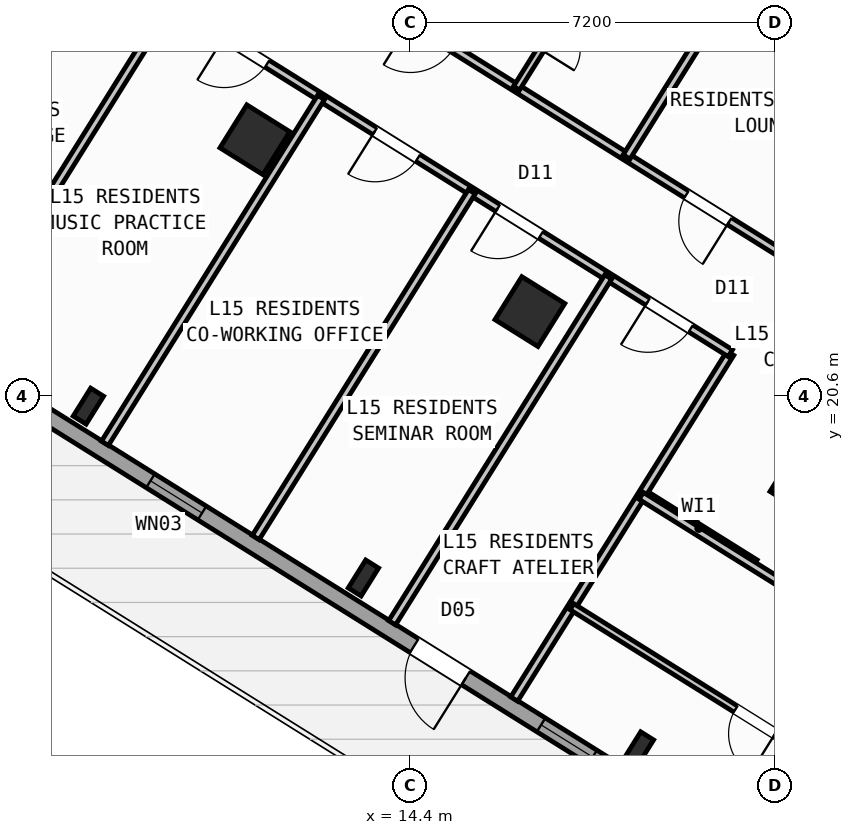
"""IFC4 building model, lengths in metres.
Left out: names, types, materials, properties, quantities, classifications, styles, units other than length and angle.
Written with IfcOpenShell. Run it as: python <this file> out.ifc"""

import sys

from ifc_helpers import new_model, si_unit, direction, frame, frame_2d, origin, origin_2d, place, context, subcontext, project, spatial, rectangle, hollow_rectangle, i_section, extrude, source, transform, mapped, element, fill, save


model = new_model("IFC4")
c1 = context("Model", 3, precision=1e-05, world=origin(), true_north=direction((0.0, 1.0)))
c2 = subcontext(c1, "Body", "Model", "MODEL_VIEW")
j1 = project(units=[si_unit("LENGTHUNIT", "METRE"), si_unit("PLANEANGLEUNIT", "RADIAN")], contexts=[c1])
p1 = place(None, origin())
s1 = spatial("IfcSite", under=j1, at=p1, CompositionType="ELEMENT")
p2 = place(p1, origin())
s2 = spatial("IfcBuilding", under=s1, at=p2, CompositionType="ELEMENT")
p3 = place(p2, frame((0.0, 0.0, 60.0)))
s3 = spatial("IfcBuildingStorey", under=s2, at=p3, CompositionType="ELEMENT", Elevation=60.0)
m1 = source(origin(), c2, "Body", "SweptSolid", [
    extrude(hollow_rectangle(XDim=1.0, YDim=1.0, WallThickness=0.04, at=origin_2d()), origin(), (0.0, 0.0, 1.0), 3.6),
])
p4 = place(p3, frame((22.191, 18.87, 0.0), z_axis=(0.0, 0.0, 1.0), x_axis=(-0.848048096156, 0.529919264233, 0.0)))
e1 = element("IfcColumn", 1, at=p4, inside=s3, PredefinedType="COLUMN", context=c2, shape_type="MappedRepresentation", body=[
    mapped(m1, transform((0.0, 0.0, 0.0), scale=1.0)),
])
m2 = source(origin(), c2, "Body", "SweptSolid", [
    extrude(i_section(OverallWidth=0.3, OverallDepth=0.65, WebThickness=0.016, FlangeThickness=0.031, at=origin_2d()), origin(), (0.0, 0.0, 1.0), 3.6),
])
p5 = place(p3, frame((18.906, 13.612, 0.0), z_axis=(0.0, 0.0, 1.0), x_axis=(-0.848048096156, 0.529919264233, 0.0)))
e2 = element("IfcColumn", 2, at=p5, inside=s3, PredefinedType="COLUMN", context=c2, shape_type="MappedRepresentation", body=[
    mapped(m2, transform((0.0, 0.0, 0.0), scale=1.0)),
])
p6 = place(p3, frame((16.764, 22.261, 0.0), z_axis=(0.0, 0.0, 1.0), x_axis=(-0.848048096156, 0.529919264233, 0.0)))
e3 = element("IfcColumn", 3, at=p6, inside=s3, PredefinedType="COLUMN", context=c2, shape_type="MappedRepresentation", body=[
    mapped(m1, transform((0.0, 0.0, 0.0), scale=1.0)),
])
p7 = place(p3, frame((13.478, 17.003, 0.0), z_axis=(0.0, 0.0, 1.0), x_axis=(-0.848048096156, 0.529919264233, 0.0)))
e4 = element("IfcColumn", 4, at=p7, inside=s3, PredefinedType="COLUMN", context=c2, shape_type="MappedRepresentation", body=[
    mapped(m2, transform((0.0, 0.0, 0.0), scale=1.0)),
])
p8 = place(p3, frame((11.336, 25.653, 0.0), z_axis=(0.0, 0.0, 1.0), x_axis=(-0.848048096156, 0.529919264233, 0.0)))
e5 = element("IfcColumn", 5, at=p8, inside=s3, PredefinedType="COLUMN", context=c2, shape_type="MappedRepresentation", body=[
    mapped(m1, transform((0.0, 0.0, 0.0), scale=1.0)),
])
p9 = place(p3, frame((8.051, 20.395, 0.0), z_axis=(0.0, 0.0, 1.0), x_axis=(-0.848048096156, 0.529919264233, 0.0)))
e6 = element("IfcColumn", 6, at=p9, inside=s3, PredefinedType="COLUMN", context=c2, shape_type="MappedRepresentation", body=[
    mapped(m2, transform((0.0, 0.0, 0.0), scale=1.0)),
])
p10 = place(p3, frame((29.268, 6.429, 0.0), z_axis=(0.0, 0.0, 1.0), x_axis=(-0.848049971435, 0.529916263149, 0.0)))
e7 = element("IfcWall", 7, at=p10, inside=s3, PredefinedType="STANDARD", context=c2, shape_type="SweptSolid", body=[
    extrude(rectangle(XDim=31.588, YDim=0.32, at=frame_2d((15.794, 0.0))), origin(), (0.0, 0.0, 1.0), 3.35),
])
p11 = place(p10, frame((16.235, 0.0, 0.0)))
e8 = element("IfcOpeningElement", 8, at=p11, cuts=e7, PredefinedType="OPENING", context=c2, shape_type="SweptSolid", body=[
    extrude(rectangle(XDim=1.2, YDim=2.15, at=frame_2d((0.6, 1.075))), frame((0.0, 0.17, 0.0), z_axis=(0.0, -1.0, 0.0), x_axis=(1.0, 0.0, 0.0)), (0.0, 0.0, 1.0), 0.34),
])
p12 = place(p10, frame((2.989, 0.0, 0.8)))
e9 = element("IfcOpeningElement", 9, at=p12, cuts=e7, PredefinedType="OPENING", context=c2, shape_type="SweptSolid", body=[
    extrude(rectangle(XDim=2.1, YDim=1.55, at=frame_2d((1.05, 0.775))), frame((0.0, 0.17, 0.0), z_axis=(0.0, -1.0, 0.0), x_axis=(1.0, 0.0, 0.0)), (0.0, 0.0, 1.0), 0.34),
])
p13 = place(p10, frame((8.359, 0.0, 0.8)))
e10 = element("IfcOpeningElement", 10, at=p13, cuts=e7, PredefinedType="OPENING", context=c2, shape_type="SweptSolid", body=[
    extrude(rectangle(XDim=2.1, YDim=1.55, at=frame_2d((1.05, 0.775))), frame((0.0, 0.17, 0.0), z_axis=(0.0, -1.0, 0.0), x_axis=(1.0, 0.0, 0.0)), (0.0, 0.0, 1.0), 0.34),
])
p14 = place(p10, frame((13.284, 0.0, 0.95)))
e11 = element("IfcOpeningElement", 11, at=p14, cuts=e7, PredefinedType="OPENING", context=c2, shape_type="SweptSolid", body=[
    extrude(rectangle(XDim=1.2, YDim=1.4, at=frame_2d((0.6, 0.7))), frame((0.0, 0.17, 0.0), z_axis=(0.0, -1.0, 0.0), x_axis=(1.0, 0.0, 0.0)), (0.0, 0.0, 1.0), 0.34),
])
p15 = place(p10, frame((22.374, 0.0, 0.95)))
e12 = element("IfcOpeningElement", 12, at=p15, cuts=e7, PredefinedType="OPENING", context=c2, shape_type="SweptSolid", body=[
    extrude(rectangle(XDim=1.2, YDim=1.4, at=frame_2d((0.6, 0.7))), frame((0.0, 0.17, 0.0), z_axis=(0.0, -1.0, 0.0), x_axis=(1.0, 0.0, 0.0)), (0.0, 0.0, 1.0), 0.34),
])
p16 = place(p10, frame((26.351, 0.0, 1.0)))
e13 = element("IfcOpeningElement", 13, at=p16, cuts=e7, PredefinedType="OPENING", context=c2, shape_type="SweptSolid", body=[
    extrude(rectangle(XDim=0.9, YDim=1.25, at=frame_2d((0.45, 0.625))), frame((0.0, 0.17, 0.0), z_axis=(0.0, -1.0, 0.0), x_axis=(1.0, 0.0, 0.0)), (0.0, 0.0, 1.0), 0.34),
])
p17 = place(p10, frame((29.052, 0.0, 0.85)))
e14 = element("IfcOpeningElement", 14, at=p17, cuts=e7, PredefinedType="OPENING", context=c2, shape_type="SweptSolid", body=[
    extrude(rectangle(XDim=1.8, YDim=1.5, at=frame_2d((0.9, 0.75))), frame((0.0, 0.17, 0.0), z_axis=(0.0, -1.0, 0.0), x_axis=(1.0, 0.0, 0.0)), (0.0, 0.0, 1.0), 0.34),
])
p18 = place(p3, frame((2.415, 23.452, 0.0), z_axis=(0.0, 0.0, 1.0), x_axis=(0.52991049553, 0.848053575387, 0.0)))
e15 = element("IfcWall", 15, at=p18, inside=s3, PredefinedType="STANDARD", context=c2, shape_type="SweptSolid", body=[
    extrude(rectangle(XDim=21.587, YDim=0.32, at=frame_2d((10.794, 0.0))), origin(), (0.0, 0.0, 1.0), 2.725),
])
p19 = place(p18, frame((2.356, 0.0, 0.8)))
e16 = element("IfcOpeningElement", 16, at=p19, cuts=e15, PredefinedType="OPENING", context=c2, shape_type="SweptSolid", body=[
    extrude(rectangle(XDim=2.1, YDim=1.55, at=frame_2d((1.05, 0.775))), frame((0.0, 0.17, 0.0), z_axis=(0.0, -1.0, 0.0), x_axis=(1.0, 0.0, 0.0)), (0.0, 0.0, 1.0), 0.34),
])
p20 = place(p18, frame((10.949, 0.0, 1.0)))
e17 = element("IfcOpeningElement", 17, at=p20, cuts=e15, PredefinedType="OPENING", context=c2, shape_type="SweptSolid", body=[
    extrude(rectangle(XDim=0.9, YDim=1.25, at=frame_2d((0.45, 0.625))), frame((0.0, 0.17, 0.0), z_axis=(0.0, -1.0, 0.0), x_axis=(1.0, 0.0, 0.0)), (0.0, 0.0, 1.0), 0.34),
])
p21 = place(p18, frame((15.394, 0.0, 0.85)))
e18 = element("IfcOpeningElement", 18, at=p21, cuts=e15, PredefinedType="OPENING", context=c2, shape_type="SweptSolid", body=[
    extrude(rectangle(XDim=1.5, YDim=1.5, at=frame_2d((0.75, 0.75))), frame((0.0, 0.17, 0.0), z_axis=(0.0, -1.0, 0.0), x_axis=(1.0, 0.0, 0.0)), (0.0, 0.0, 1.0), 0.34),
])
p22 = place(p18, frame((18.194, 0.0, 0.85)))
e19 = element("IfcOpeningElement", 19, at=p22, cuts=e15, PredefinedType="OPENING", context=c2, shape_type="SweptSolid", body=[
    extrude(rectangle(XDim=1.5, YDim=1.5, at=frame_2d((0.75, 0.75))), frame((0.0, 0.17, 0.0), z_axis=(0.0, -1.0, 0.0), x_axis=(1.0, 0.0, 0.0)), (0.0, 0.0, 1.0), 0.34),
])
p23 = place(p3, frame((14.138, 41.825, 0.0), z_axis=(0.0, 0.0, 1.0), x_axis=(0.848046498049, -0.529921821731, 0.0)))
e20 = element("IfcWall", 20, at=p23, inside=s3, PredefinedType="STANDARD", context=c2, shape_type="SweptSolid", body=[
    extrude(rectangle(XDim=31.588, YDim=0.32, at=frame_2d((15.794, 0.0))), origin(), (0.0, 0.0, 1.0), 3.35),
])
p24 = place(p23, frame((9.772, 0.0, 0.0)))
e21 = element("IfcOpeningElement", 21, at=p24, cuts=e20, PredefinedType="OPENING", context=c2, shape_type="SweptSolid", body=[
    extrude(rectangle(XDim=1.05, YDim=2.15, at=frame_2d((0.525, 1.075))), frame((0.0, 0.17, 0.0), z_axis=(0.0, -1.0, 0.0), x_axis=(1.0, 0.0, 0.0)), (0.0, 0.0, 1.0), 0.34),
])
p25 = place(p23, frame((0.966, 0.0, 0.85)))
e22 = element("IfcOpeningElement", 22, at=p25, cuts=e20, PredefinedType="OPENING", context=c2, shape_type="SweptSolid", body=[
    extrude(rectangle(XDim=1.5, YDim=1.5, at=frame_2d((0.75, 0.75))), frame((0.0, 0.17, 0.0), z_axis=(0.0, -1.0, 0.0), x_axis=(1.0, 0.0, 0.0)), (0.0, 0.0, 1.0), 0.34),
])
p26 = place(p23, frame((4.121, 0.0, 1.0)))
e23 = element("IfcOpeningElement", 23, at=p26, cuts=e20, PredefinedType="OPENING", context=c2, shape_type="SweptSolid", body=[
    extrude(rectangle(XDim=0.9, YDim=1.25, at=frame_2d((0.45, 0.625))), frame((0.0, 0.17, 0.0), z_axis=(0.0, -1.0, 0.0), x_axis=(1.0, 0.0, 0.0)), (0.0, 0.0, 1.0), 0.34),
])
p27 = place(p23, frame((13.899, 0.0, 0.85)))
e24 = element("IfcOpeningElement", 24, at=p27, cuts=e20, PredefinedType="OPENING", context=c2, shape_type="SweptSolid", body=[
    extrude(rectangle(XDim=1.5, YDim=1.5, at=frame_2d((0.75, 0.75))), frame((0.0, 0.17, 0.0), z_axis=(0.0, -1.0, 0.0), x_axis=(1.0, 0.0, 0.0)), (0.0, 0.0, 1.0), 0.34),
])
p28 = place(p23, frame((22.019, 0.0, 0.95)))
e25 = element("IfcOpeningElement", 25, at=p28, cuts=e20, PredefinedType="OPENING", context=c2, shape_type="SweptSolid", body=[
    extrude(rectangle(XDim=1.2, YDim=1.4, at=frame_2d((0.6, 0.7))), frame((0.0, 0.17, 0.0), z_axis=(0.0, -1.0, 0.0), x_axis=(1.0, 0.0, 0.0)), (0.0, 0.0, 1.0), 0.34),
])
p29 = place(p23, frame((27.569, 0.0, 0.95)))
e26 = element("IfcOpeningElement", 26, at=p29, cuts=e20, PredefinedType="OPENING", context=c2, shape_type="SweptSolid", body=[
    extrude(rectangle(XDim=1.2, YDim=1.4, at=frame_2d((0.6, 0.7))), frame((0.0, 0.17, 0.0), z_axis=(0.0, -1.0, 0.0), x_axis=(1.0, 0.0, 0.0)), (0.0, 0.0, 1.0), 0.34),
])
p30 = place(p3, frame((21.206, 17.292, 0.0), z_axis=(0.0, 0.0, 1.0), x_axis=(-0.848050851465, 0.529914854792, 0.0)))
e27 = element("IfcWall", 27, at=p30, inside=s3, PredefinedType="PARTITIONING", context=c2, shape_type="SweptSolid", body=[
    extrude(rectangle(XDim=2.61, YDim=0.16, at=frame_2d((1.305, 0.0))), origin(), (0.0, 0.0, 1.0), 3.34),
])
p31 = place(p3, frame((20.719, 21.44, 0.0), z_axis=(0.0, 0.0, 1.0), x_axis=(-0.529906246318, -0.848056230514, 0.0)))
e28 = element("IfcWall", 28, at=p31, inside=s3, PredefinedType="PARTITIONING", context=c2, shape_type="SweptSolid", body=[
    extrude(rectangle(XDim=8.05, YDim=0.16, at=frame_2d((4.025, 0.0))), origin(), (0.0, 0.0, 1.0), 3.34),
])
p32 = place(p3, frame((21.885, 23.306, 0.0), z_axis=(0.0, 0.0, 1.0), x_axis=(-0.848052408131, 0.529912363569, 0.0)))
e29 = element("IfcWall", 29, at=p32, inside=s3, PredefinedType="PARTITIONING", context=c2, shape_type="SweptSolid", body=[
    extrude(rectangle(XDim=16.73, YDim=0.16, at=frame_2d((8.365, 0.0))), origin(), (0.0, 0.0, 1.0), 3.34),
])
p33 = place(p32, frame((1.395, 0.0, 0.0)))
e30 = element("IfcOpeningElement", 30, at=p33, cuts=e29, PredefinedType="OPENING", context=c2, shape_type="SweptSolid", body=[
    extrude(rectangle(XDim=1.0, YDim=2.1, at=frame_2d((0.5, 1.05))), frame((0.0, 0.09, 0.0), z_axis=(0.0, -1.0, 0.0), x_axis=(1.0, 0.0, 0.0)), (0.0, 0.0, 1.0), 0.18),
])
p34 = place(p32, frame((7.82, 0.0, 0.0)))
e31 = element("IfcOpeningElement", 31, at=p34, cuts=e29, PredefinedType="OPENING", context=c2, shape_type="SweptSolid", body=[
    extrude(rectangle(XDim=1.0, YDim=2.1, at=frame_2d((0.5, 1.05))), frame((0.0, 0.09, 0.0), z_axis=(0.0, -1.0, 0.0), x_axis=(1.0, 0.0, 0.0)), (0.0, 0.0, 1.0), 0.18),
])
p35 = place(p32, frame((11.14, 0.0, 0.0)))
e32 = element("IfcOpeningElement", 32, at=p35, cuts=e29, PredefinedType="OPENING", context=c2, shape_type="SweptSolid", body=[
    extrude(rectangle(XDim=1.0, YDim=2.1, at=frame_2d((0.5, 1.05))), frame((0.0, 0.09, 0.0), z_axis=(0.0, -1.0, 0.0), x_axis=(1.0, 0.0, 0.0)), (0.0, 0.0, 1.0), 0.18),
])
p36 = place(p3, frame((20.719, 21.44, 0.0), z_axis=(0.0, 0.0, 1.0), x_axis=(-0.848048310262, 0.529918921593, 0.0)))
e33 = element("IfcWall", 33, at=p36, inside=s3, PredefinedType="PARTITIONING", context=c2, shape_type="SweptSolid", body=[
    extrude(rectangle(XDim=16.73, YDim=0.16, at=frame_2d((8.365, 0.0))), origin(), (0.0, 0.0, 1.0), 3.34),
])
p37 = place(p36, frame((0.92, 0.0, 0.0)))
e34 = element("IfcOpeningElement", 34, at=p37, cuts=e33, PredefinedType="OPENING", context=c2, shape_type="SweptSolid", body=[
    extrude(rectangle(XDim=1.0, YDim=2.1, at=frame_2d((0.5, 1.05))), frame((0.0, 0.09, 0.0), z_axis=(0.0, -1.0, 0.0), x_axis=(1.0, 0.0, 0.0)), (0.0, 0.0, 1.0), 0.18),
])
p38 = place(p36, frame((4.408, 0.0, 0.0)))
e35 = element("IfcOpeningElement", 35, at=p38, cuts=e33, PredefinedType="OPENING", context=c2, shape_type="SweptSolid", body=[
    extrude(rectangle(XDim=1.0, YDim=2.1, at=frame_2d((0.5, 1.05))), frame((0.0, 0.09, 0.0), z_axis=(0.0, -1.0, 0.0), x_axis=(1.0, 0.0, 0.0)), (0.0, 0.0, 1.0), 0.18),
])
p39 = place(p36, frame((7.271, 0.0, 0.0)))
e36 = element("IfcOpeningElement", 36, at=p39, cuts=e33, PredefinedType="OPENING", context=c2, shape_type="SweptSolid", body=[
    extrude(rectangle(XDim=1.0, YDim=2.1, at=frame_2d((0.5, 1.05))), frame((0.0, 0.09, 0.0), z_axis=(0.0, -1.0, 0.0), x_axis=(1.0, 0.0, 0.0)), (0.0, 0.0, 1.0), 0.18),
])
p40 = place(p36, frame((10.78, 0.0, 0.0)))
e37 = element("IfcOpeningElement", 37, at=p40, cuts=e33, PredefinedType="OPENING", context=c2, shape_type="SweptSolid", body=[
    extrude(rectangle(XDim=1.0, YDim=2.1, at=frame_2d((0.5, 1.05))), frame((0.0, 0.09, 0.0), z_axis=(0.0, -1.0, 0.0), x_axis=(1.0, 0.0, 0.0)), (0.0, 0.0, 1.0), 0.18),
])
p41 = place(p36, frame((14.372, 0.0, 0.0)))
e38 = element("IfcOpeningElement", 38, at=p41, cuts=e33, PredefinedType="OPENING", context=c2, shape_type="SweptSolid", body=[
    extrude(rectangle(XDim=1.0, YDim=2.1, at=frame_2d((0.5, 1.05))), frame((0.0, 0.09, 0.0), z_axis=(0.0, -1.0, 0.0), x_axis=(1.0, 0.0, 0.0)), (0.0, 0.0, 1.0), 0.18),
])
p42 = place(p3, frame((18.31, 22.946, 0.0), z_axis=(0.0, 0.0, 1.0), x_axis=(-0.529914428959, -0.848051117552, 0.0)))
e39 = element("IfcWall", 39, at=p42, inside=s3, PredefinedType="PARTITIONING", context=c2, shape_type="SweptSolid", body=[
    extrude(rectangle(XDim=8.05, YDim=0.16, at=frame_2d((4.025, 0.0))), origin(), (0.0, 0.0, 1.0), 3.34),
])
p43 = place(p3, frame((15.618, 24.628, 0.0), z_axis=(0.0, 0.0, 1.0), x_axis=(-0.529928058306, -0.848042600947, 0.0)))
e40 = element("IfcWall", 40, at=p43, inside=s3, PredefinedType="PARTITIONING", context=c2, shape_type="SweptSolid", body=[
    extrude(rectangle(XDim=8.05, YDim=0.16, at=frame_2d((4.025, 0.0))), origin(), (0.0, 0.0, 1.0), 2.995),
])
p44 = place(p3, frame((12.642, 26.488, 0.0), z_axis=(0.0, 0.0, 1.0), x_axis=(-0.529914428959, -0.848051117552, 0.0)))
e41 = element("IfcWall", 41, at=p44, inside=s3, PredefinedType="PARTITIONING", context=c2, shape_type="SweptSolid", body=[
    extrude(rectangle(XDim=8.05, YDim=0.16, at=frame_2d((4.025, 0.0))), origin(), (0.0, 0.0, 1.0), 3.34),
])
p45 = place(p3, frame((9.666, 28.347, 0.0), z_axis=(0.0, 0.0, 1.0), x_axis=(-0.529928058306, -0.848042600947, 0.0)))
e42 = element("IfcWall", 42, at=p45, inside=s3, PredefinedType="PARTITIONING", context=c2, shape_type="SweptSolid", body=[
    extrude(rectangle(XDim=8.05, YDim=0.16, at=frame_2d((4.025, 0.0))), origin(), (0.0, 0.0, 1.0), 3.34),
])
p46 = place(p3, frame((20.361, 28.018, 0.0), z_axis=(0.0, 0.0, 1.0), x_axis=(-0.529875025416, -0.848075738033, 0.0)))
e43 = element("IfcWall", 43, at=p46, inside=s3, PredefinedType="PARTITIONING", context=c2, shape_type="SweptSolid", body=[
    extrude(rectangle(XDim=3.188, YDim=0.16, at=frame_2d((1.594, 0.0))), origin(), (0.0, 0.0, 1.0), 2.725),
])
p47 = place(p3, frame((17.867, 28.859, 0.0), z_axis=(0.0, 0.0, 1.0), x_axis=(-0.529913878929, -0.848051461244, 0.0)))
e44 = element("IfcWall", 44, at=p47, inside=s3, PredefinedType="PLUMBINGWALL", context=c2, shape_type="SweptSolid", body=[
    extrude(rectangle(XDim=2.58, YDim=0.14, at=frame_2d((1.29, 0.0))), origin(), (0.0, 0.0, 1.0), 3.34),
])
p48 = place(p47, frame((0.9, 0.0, 0.0)))
e45 = element("IfcOpeningElement", 45, at=p48, cuts=e44, PredefinedType="OPENING", context=c2, shape_type="SweptSolid", body=[
    extrude(rectangle(XDim=0.78, YDim=2.05, at=frame_2d((0.39, 1.025))), frame((0.0, 0.08, 0.0), z_axis=(0.0, -1.0, 0.0), x_axis=(1.0, 0.0, 0.0)), (0.0, 0.0, 1.0), 0.16),
])
p49 = place(p3, frame((32.164, 10.374, 0.0), z_axis=(0.0, 0.0, 1.0), x_axis=(-0.848044107957, 0.529925646633, 0.0)))
e46 = element("IfcWall", 46, at=p49, inside=s3, PredefinedType="PARTITIONING", context=c2, shape_type="SweptSolid", body=[
    extrude(rectangle(XDim=15.57, YDim=0.16, at=frame_2d((7.785, 0.0))), origin(), (0.0, 0.0, 1.0), 3.34),
])
p50 = place(p49, frame((10.83, 0.0, 0.0)))
e47 = element("IfcOpeningElement", 47, at=p50, cuts=e46, PredefinedType="OPENING", context=c2, shape_type="SweptSolid", body=[
    extrude(rectangle(XDim=1.0, YDim=2.1, at=frame_2d((0.5, 1.05))), frame((0.0, 0.09, 0.0), z_axis=(0.0, -1.0, 0.0), x_axis=(1.0, 0.0, 0.0)), (0.0, 0.0, 1.0), 0.18),
])
p51 = place(p3, frame((29.72, 8.859, 0.0), z_axis=(0.0, 0.0, 1.0), x_axis=(-0.848049134363, 0.529917602752, 0.0)))
e48 = element("IfcWall", 48, at=p51, inside=s3, PredefinedType="PLUMBINGWALL", context=c2, shape_type="SweptSolid", body=[
    extrude(rectangle(XDim=14.3, YDim=0.14, at=frame_2d((7.15, 0.0))), origin(), (0.0, 0.0, 1.0), 3.34),
])
p52 = place(p51, frame((9.57, 0.0, 0.0)))
e49 = element("IfcOpeningElement", 49, at=p52, cuts=e48, PredefinedType="OPENING", context=c2, shape_type="SweptSolid", body=[
    extrude(rectangle(XDim=0.92, YDim=2.08, at=frame_2d((0.46, 1.04))), frame((0.0, 0.08, 0.0), z_axis=(0.0, -1.0, 0.0), x_axis=(1.0, 0.0, 0.0)), (0.0, 0.0, 1.0), 0.16),
])
m3 = source(origin(), c2, "Body", "SweptSolid", [
    extrude(rectangle(XDim=1.2, YDim=2.15, at=frame_2d((0.6, 1.075))), frame((0.0, 0.025, 0.0), z_axis=(0.0, -1.0, 0.0), x_axis=(1.0, 0.0, 0.0)), (0.0, 0.0, 1.0), 0.05),
])
p53 = place(p11, origin())
e50 = element("IfcDoor", 50, at=p53, inside=s3, OperationType="SINGLE_SWING_LEFT", PredefinedType="DOOR", context=c2, shape_type="MappedRepresentation", body=[
    mapped(m3, transform((0.0, 0.0, 0.0), scale=1.0)),
])
fill(e8, e50)
m4 = source(origin(), c2, "Body", "SweptSolid", [
    extrude(rectangle(XDim=1.2, YDim=1.4, at=frame_2d((0.6, 0.7))), frame((0.0, 0.03, 0.0), z_axis=(0.0, -1.0, 0.0), x_axis=(1.0, 0.0, 0.0)), (0.0, 0.0, 1.0), 0.06),
])
p54 = place(p14, origin())
e51 = element("IfcWindow", 51, at=p54, inside=s3, PartitioningType="SINGLE_PANEL", PredefinedType="WINDOW", context=c2, shape_type="MappedRepresentation", body=[
    mapped(m4, transform((0.0, 0.0, 0.0), scale=1.0)),
])
fill(e11, e51)
p55 = place(p15, origin())
e52 = element("IfcWindow", 52, at=p55, inside=s3, PartitioningType="SINGLE_PANEL", PredefinedType="WINDOW", context=c2, shape_type="MappedRepresentation", body=[
    mapped(m4, transform((0.0, 0.0, 0.0), scale=1.0)),
])
fill(e12, e52)
m5 = source(origin(), c2, "Body", "SweptSolid", [
    extrude(rectangle(XDim=1.0, YDim=2.1, at=frame_2d((0.5, 1.05))), frame((0.0, 0.025, 0.0), z_axis=(0.0, -1.0, 0.0), x_axis=(1.0, 0.0, 0.0)), (0.0, 0.0, 1.0), 0.05),
])
p56 = place(p37, origin())
e53 = element("IfcDoor", 53, at=p56, inside=s3, OperationType="SINGLE_SWING_RIGHT", PredefinedType="DOOR", context=c2, shape_type="MappedRepresentation", body=[
    mapped(m5, transform((0.0, 0.0, 0.0), scale=1.0)),
])
fill(e34, e53)
p57 = place(p38, origin())
e54 = element("IfcDoor", 54, at=p57, inside=s3, OperationType="SINGLE_SWING_RIGHT", PredefinedType="DOOR", context=c2, shape_type="MappedRepresentation", body=[
    mapped(m5, transform((0.0, 0.0, 0.0), scale=1.0)),
])
fill(e35, e54)
p58 = place(p39, origin())
e55 = element("IfcDoor", 55, at=p58, inside=s3, OperationType="SINGLE_SWING_RIGHT", PredefinedType="DOOR", context=c2, shape_type="MappedRepresentation", body=[
    mapped(m5, transform((0.0, 0.0, 0.0), scale=1.0)),
])
fill(e36, e55)
p59 = place(p40, origin())
e56 = element("IfcDoor", 56, at=p59, inside=s3, OperationType="SINGLE_SWING_RIGHT", PredefinedType="DOOR", context=c2, shape_type="MappedRepresentation", body=[
    mapped(m5, transform((0.0, 0.0, 0.0), scale=1.0)),
])
fill(e37, e56)
p60 = place(p33, origin())
e57 = element("IfcDoor", 57, at=p60, inside=s3, OperationType="SINGLE_SWING_LEFT", PredefinedType="DOOR", context=c2, shape_type="MappedRepresentation", body=[
    mapped(m5, transform((0.0, 0.0, 0.0), scale=1.0)),
])
fill(e30, e57)
m6 = source(origin(), c2, "Body", "SweptSolid", [
    extrude(rectangle(XDim=0.92, YDim=2.08, at=frame_2d((0.46, 1.04))), frame((0.0, 0.025, 0.0), z_axis=(0.0, -1.0, 0.0), x_axis=(1.0, 0.0, 0.0)), (0.0, 0.0, 1.0), 0.05),
])
p61 = place(p52, origin())
e58 = element("IfcDoor", 58, at=p61, inside=s3, OperationType="SINGLE_SWING_LEFT", PredefinedType="DOOR", context=c2, shape_type="MappedRepresentation", body=[
    mapped(m6, transform((0.0, 0.0, 0.0), scale=1.0)),
])
fill(e49, e58)
save(model, sys.argv[1])
